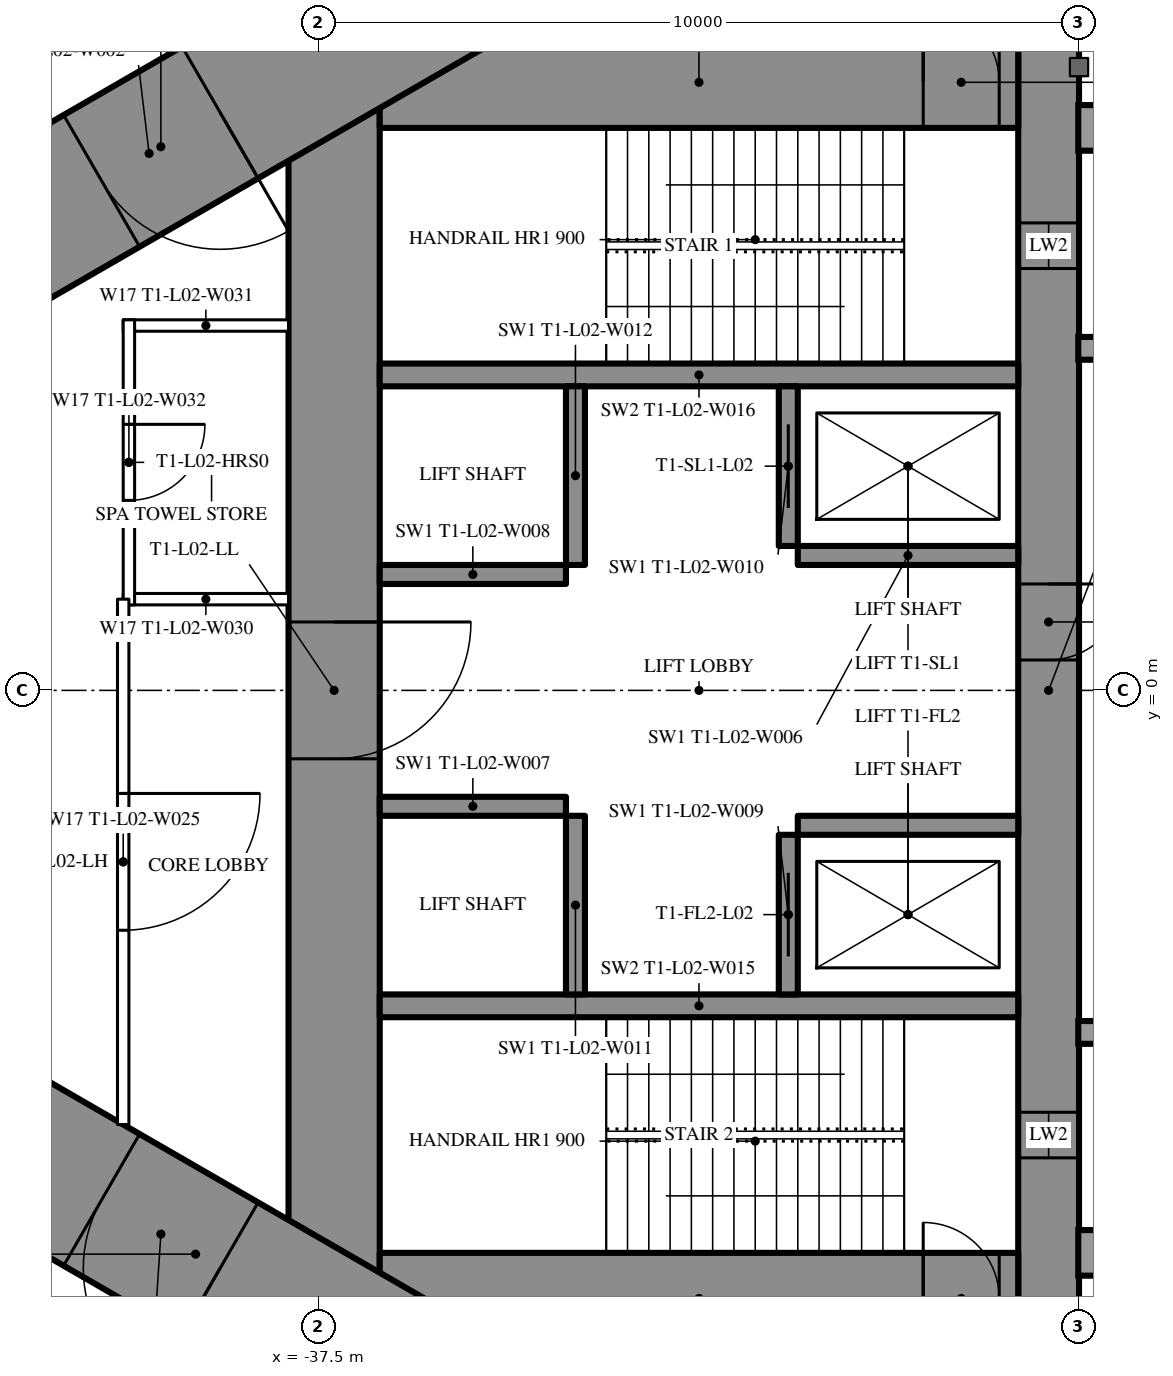
"""IFC4 building model, lengths in metres.
Left out: names, types, materials, properties, quantities, classifications, styles, units other than length and angle.
Written with IfcOpenShell. Run it as: python <this file> out.ifc"""

import sys

from ifc_helpers import new_model, si_unit, direction, frame, frame_2d, origin, place, context, subcontext, project, spatial, rectangle, extrude, element, fill, save


model = new_model("IFC4")
c1 = context("Model", 3, precision=1e-05, world=origin(), true_north=direction((0.0, 1.0)))
c2 = subcontext(c1, "Body", "Model", "MODEL_VIEW")
j1 = project(units=[si_unit("LENGTHUNIT", "METRE"), si_unit("PLANEANGLEUNIT", "RADIAN")], contexts=[c1])
p1 = place(None, origin())
s1 = spatial("IfcSite", under=j1, at=p1, CompositionType="ELEMENT")
p2 = place(p1, origin())
s2 = spatial("IfcBuilding", under=s1, at=p2, CompositionType="ELEMENT")
p3 = place(p2, frame((0.0, 0.0, 12.6)))
s3 = spatial("IfcBuildingStorey", under=s2, at=p3, CompositionType="ELEMENT", Elevation=12.6)
p4 = place(p3, frame((-27.9, 8.6, 0.0), z_axis=(0.0, 0.0, 1.0), x_axis=(0.0, -1.0, 0.0)))
e1 = element("IfcWall", 1, at=p4, inside=s3, PredefinedType="SHEAR", context=c2, shape_type="SweptSolid", body=[
    extrude(rectangle(XDim=17.2, YDim=0.8, at=frame_2d((8.6, 0.0))), origin(), (0.0, 0.0, 1.0), 5.4),
])
p5 = place(p4, frame((7.2, 0.0, 0.0)))
e2 = element("IfcOpeningElement", 2, at=p5, cuts=e1, PredefinedType="OPENING", context=c2, shape_type="SweptSolid", body=[
    extrude(rectangle(XDim=1.0, YDim=2.2, at=frame_2d((0.5, 1.1))), frame((0.0, 0.41, 0.0), z_axis=(0.0, -1.0, 0.0), x_axis=(1.0, 0.0, 0.0)), (0.0, 0.0, 1.0), 0.82),
])
p6 = place(p4, frame((2.45, 0.0, 0.6)))
e3 = element("IfcOpeningElement", 3, at=p6, cuts=e1, PredefinedType="OPENING", context=c2, shape_type="SweptSolid", body=[
    extrude(rectangle(XDim=0.6, YDim=3.9, at=frame_2d((0.3, 1.95))), frame((0.0, 0.41, 0.0), z_axis=(0.0, -1.0, 0.0), x_axis=(1.0, 0.0, 0.0)), (0.0, 0.0, 1.0), 0.82),
])
p7 = place(p4, frame((14.15, 0.0, 0.6)))
e4 = element("IfcOpeningElement", 4, at=p7, cuts=e1, PredefinedType="OPENING", context=c2, shape_type="SweptSolid", body=[
    extrude(rectangle(XDim=0.6, YDim=3.9, at=frame_2d((0.3, 1.95))), frame((0.0, 0.41, 0.0), z_axis=(0.0, -1.0, 0.0), x_axis=(1.0, 0.0, 0.0)), (0.0, 0.0, 1.0), 0.82),
])
p8 = place(p3, frame((-37.3, 8.6, 0.0), z_axis=(0.0, 0.0, 1.0), x_axis=(0.0, -1.0, 0.0)))
e5 = element("IfcWall", 5, at=p8, inside=s3, PredefinedType="SHEAR", context=c2, shape_type="SweptSolid", body=[
    extrude(rectangle(XDim=17.2, YDim=1.2, at=frame_2d((8.6, 0.0))), origin(), (0.0, 0.0, 1.0), 5.4),
])
p9 = place(p8, frame((7.7, 0.0, 0.0)))
e6 = element("IfcOpeningElement", 6, at=p9, cuts=e5, PredefinedType="OPENING", context=c2, shape_type="SweptSolid", body=[
    extrude(rectangle(XDim=1.8, YDim=2.2, at=frame_2d((0.9, 1.1))), frame((0.0, 0.61, 0.0), z_axis=(0.0, -1.0, 0.0), x_axis=(1.0, 0.0, 0.0)), (0.0, 0.0, 1.0), 1.22),
])
p10 = place(p3, frame((-28.3, 8.0, 0.0), z_axis=(0.0, 0.0, 1.0), x_axis=(-1.0, 0.0, 0.0)))
e7 = element("IfcWall", 7, at=p10, inside=s3, PredefinedType="SHEAR", context=c2, shape_type="SweptSolid", body=[
    extrude(rectangle(XDim=8.4, YDim=1.2, at=frame_2d((4.2, 0.0))), origin(), (0.0, 0.0, 1.0), 5.4),
])
p11 = place(p10, frame((0.25, 0.0, 0.0)))
e8 = element("IfcOpeningElement", 8, at=p11, cuts=e7, PredefinedType="OPENING", context=c2, shape_type="SweptSolid", body=[
    extrude(rectangle(XDim=1.0, YDim=2.2, at=frame_2d((0.5, 1.1))), frame((0.0, 0.61, 0.0), z_axis=(0.0, -1.0, 0.0), x_axis=(1.0, 0.0, 0.0)), (0.0, 0.0, 1.0), 1.22),
])
p12 = place(p3, frame((-28.3, -8.0, 0.0), z_axis=(0.0, 0.0, 1.0), x_axis=(-1.0, 0.0, 0.0)))
e9 = element("IfcWall", 9, at=p12, inside=s3, PredefinedType="SHEAR", context=c2, shape_type="SweptSolid", body=[
    extrude(rectangle(XDim=8.4, YDim=1.2, at=frame_2d((4.2, 0.0))), origin(), (0.0, 0.0, 1.0), 5.4),
])
p13 = place(p12, frame((0.25, 0.0, 0.0)))
e10 = element("IfcOpeningElement", 10, at=p13, cuts=e9, PredefinedType="OPENING", context=c2, shape_type="SweptSolid", body=[
    extrude(rectangle(XDim=1.0, YDim=2.2, at=frame_2d((0.5, 1.1))), frame((0.0, 0.61, 0.0), z_axis=(0.0, -1.0, 0.0), x_axis=(1.0, 0.0, 0.0)), (0.0, 0.0, 1.0), 1.22),
])
for number, where, z_axis, x_axis in (
    (11, (-28.3, 4.15, 0.0), (0.0, 0.0, 1.0), (-1.0, 0.0, 0.0)),
    (12, (-28.3, -4.15, 0.0), (0.0, 0.0, 1.0), (-1.0, 0.0, 0.0)),
):
    element("IfcWall", number, at=place(p3, frame(where, z_axis=z_axis, x_axis=x_axis)), inside=s3, PredefinedType="SHEAR", context=c2, shape_type="SweptSolid", body=[
        extrude(rectangle(XDim=8.4, YDim=0.3, at=frame_2d((4.2, 0.0))), origin(), (0.0, 0.0, 1.0), 5.4),
    ])
p14 = place(p3, frame((-31.325, 4.0, 0.0), z_axis=(0.0, 0.0, 1.0), x_axis=(0.0, -1.0, 0.0)))
e13 = element("IfcWall", 13, at=p14, inside=s3, PredefinedType="SHEAR", context=c2, shape_type="SweptSolid", body=[
    extrude(rectangle(XDim=2.1, YDim=0.25, at=frame_2d((1.05, 0.0))), origin(), (0.0, 0.0, 1.0), 5.4),
])
p15 = place(p14, frame((0.5, 0.0, 0.0)))
e14 = element("IfcOpeningElement", 14, at=p15, cuts=e13, PredefinedType="OPENING", context=c2, shape_type="SweptSolid", body=[
    extrude(rectangle(XDim=1.1, YDim=2.2, at=frame_2d((0.55, 1.1))), frame((0.0, 0.135, 0.0), z_axis=(0.0, -1.0, 0.0), x_axis=(1.0, 0.0, 0.0)), (0.0, 0.0, 1.0), 0.27),
])
p16 = place(p3, frame((-34.125, 4.0, 0.0), z_axis=(0.0, 0.0, 1.0), x_axis=(0.0, -1.0, 0.0)))
e15 = element("IfcWall", 15, at=p16, inside=s3, PredefinedType="SHEAR", context=c2, shape_type="SweptSolid", body=[
    extrude(rectangle(XDim=2.35, YDim=0.25, at=frame_2d((1.175, 0.0))), origin(), (0.0, 0.0, 1.0), 5.4),
])
p17 = place(p3, frame((-28.3, 1.775, 0.0), z_axis=(0.0, 0.0, 1.0), x_axis=(-1.0, 0.0, 0.0)))
e16 = element("IfcWall", 16, at=p17, inside=s3, PredefinedType="SHEAR", context=c2, shape_type="SweptSolid", body=[
    extrude(rectangle(XDim=2.9, YDim=0.25, at=frame_2d((1.45, 0.0))), origin(), (0.0, 0.0, 1.0), 5.4),
])
p18 = place(p3, frame((-34.25, 1.525, 0.0), z_axis=(0.0, 0.0, 1.0), x_axis=(-1.0, 0.0, 0.0)))
e17 = element("IfcWall", 17, at=p18, inside=s3, PredefinedType="SHEAR", context=c2, shape_type="SweptSolid", body=[
    extrude(rectangle(XDim=2.45, YDim=0.25, at=frame_2d((1.225, 0.0))), origin(), (0.0, 0.0, 1.0), 5.4),
])
p19 = place(p3, frame((-31.325, -1.9, 0.0), z_axis=(0.0, 0.0, 1.0), x_axis=(0.0, -1.0, 0.0)))
e18 = element("IfcWall", 18, at=p19, inside=s3, PredefinedType="SHEAR", context=c2, shape_type="SweptSolid", body=[
    extrude(rectangle(XDim=2.1, YDim=0.25, at=frame_2d((1.05, 0.0))), origin(), (0.0, 0.0, 1.0), 5.4),
])
p20 = place(p19, frame((0.5, 0.0, 0.0)))
e19 = element("IfcOpeningElement", 19, at=p20, cuts=e18, PredefinedType="OPENING", context=c2, shape_type="SweptSolid", body=[
    extrude(rectangle(XDim=1.1, YDim=2.2, at=frame_2d((0.55, 1.1))), frame((0.0, 0.135, 0.0), z_axis=(0.0, -1.0, 0.0), x_axis=(1.0, 0.0, 0.0)), (0.0, 0.0, 1.0), 0.27),
])
p21 = place(p3, frame((-34.125, -1.65, 0.0), z_axis=(0.0, 0.0, 1.0), x_axis=(0.0, -1.0, 0.0)))
e20 = element("IfcWall", 20, at=p21, inside=s3, PredefinedType="SHEAR", context=c2, shape_type="SweptSolid", body=[
    extrude(rectangle(XDim=2.35, YDim=0.25, at=frame_2d((1.175, 0.0))), origin(), (0.0, 0.0, 1.0), 5.4),
])
p22 = place(p3, frame((-28.3, -1.775, 0.0), z_axis=(0.0, 0.0, 1.0), x_axis=(-1.0, 0.0, 0.0)))
e21 = element("IfcWall", 21, at=p22, inside=s3, PredefinedType="SHEAR", context=c2, shape_type="SweptSolid", body=[
    extrude(rectangle(XDim=2.9, YDim=0.25, at=frame_2d((1.45, 0.0))), origin(), (0.0, 0.0, 1.0), 5.4),
])
p23 = place(p3, frame((-34.25, -1.525, 0.0), z_axis=(0.0, 0.0, 1.0), x_axis=(-1.0, 0.0, 0.0)))
e22 = element("IfcWall", 22, at=p23, inside=s3, PredefinedType="SHEAR", context=c2, shape_type="SweptSolid", body=[
    extrude(rectangle(XDim=2.45, YDim=0.25, at=frame_2d((1.225, 0.0))), origin(), (0.0, 0.0, 1.0), 5.4),
])
p24 = place(p3, frame((-27.2, 14.3, 0.0), z_axis=(0.0, 0.0, 1.0), x_axis=(-0.866026593062, -0.499997940104, 0.0)))
e23 = element("IfcWall", 23, at=p24, inside=s3, PredefinedType="SHEAR", context=c2, shape_type="SweptSolid", body=[
    extrude(rectangle(XDim=28.946, YDim=2.0, at=frame_2d((14.473, 0.0))), origin(), (0.0, 0.0, 1.0), 5.4),
])
p25 = place(p24, frame((4.6, 0.0, 0.0)))
e24 = element("IfcOpeningElement", 24, at=p25, cuts=e23, PredefinedType="OPENING", context=c2, shape_type="SweptSolid", body=[
    extrude(rectangle(XDim=1.0, YDim=2.2, at=frame_2d((0.5, 1.1))), frame((0.0, 1.01, 0.0), z_axis=(0.0, -1.0, 0.0), x_axis=(1.0, 0.0, 0.0)), (0.0, 0.0, 1.0), 2.02),
])
p26 = place(p24, frame((13.395, 0.0, 0.0)))
e25 = element("IfcOpeningElement", 25, at=p26, cuts=e23, PredefinedType="OPENING", context=c2, shape_type="SweptSolid", body=[
    extrude(rectangle(XDim=1.8, YDim=2.2, at=frame_2d((0.9, 1.1))), frame((0.0, 1.01, 0.0), z_axis=(0.0, -1.0, 0.0), x_axis=(1.0, 0.0, 0.0)), (0.0, 0.0, 1.0), 2.02),
])
p27 = place(p3, frame((-27.2, -14.3, 0.0), z_axis=(0.0, 0.0, 1.0), x_axis=(-0.866024044937, 0.500002353585, 0.0)))
e26 = element("IfcWall", 26, at=p27, inside=s3, PredefinedType="SHEAR", context=c2, shape_type="SweptSolid", body=[
    extrude(rectangle(XDim=27.533, YDim=2.0, at=frame_2d((13.767, 0.0))), origin(), (0.0, 0.0, 1.0), 5.4),
])
p28 = place(p27, frame((4.6, 0.0, 0.0)))
e27 = element("IfcOpeningElement", 27, at=p28, cuts=e26, PredefinedType="OPENING", context=c2, shape_type="SweptSolid", body=[
    extrude(rectangle(XDim=1.0, YDim=2.2, at=frame_2d((0.5, 1.1))), frame((0.0, 1.01, 0.0), z_axis=(0.0, -1.0, 0.0), x_axis=(1.0, 0.0, 0.0)), (0.0, 0.0, 1.0), 2.02),
])
p29 = place(p27, frame((13.395, 0.0, 0.0)))
e28 = element("IfcOpeningElement", 28, at=p29, cuts=e26, PredefinedType="OPENING", context=c2, shape_type="SweptSolid", body=[
    extrude(rectangle(XDim=1.8, YDim=2.2, at=frame_2d((0.9, 1.1))), frame((0.0, 1.01, 0.0), z_axis=(0.0, -1.0, 0.0), x_axis=(1.0, 0.0, 0.0)), (0.0, 0.0, 1.0), 2.02),
])
p30 = place(p3, frame((-37.9, 11.24, 0.0), z_axis=(0.0, 0.0, 1.0), x_axis=(-0.866022995118, -0.50000417191, 0.0)))
e29 = element("IfcWall", 29, at=p30, inside=s3, PredefinedType="PARTITIONING", context=c2, shape_type="SweptSolid", body=[
    extrude(rectangle(XDim=22.48, YDim=0.2, at=frame_2d((11.24, 0.0))), origin(), (0.0, 0.0, 1.0), 4.25),
])
p31 = place(p30, frame((14.644, 0.0, 0.0)))
e30 = element("IfcOpeningElement", 30, at=p31, cuts=e29, PredefinedType="OPENING", context=c2, shape_type="SweptSolid", body=[
    extrude(rectangle(XDim=1.8, YDim=2.2, at=frame_2d((0.9, 1.1))), frame((0.0, 0.11, 0.0), z_axis=(0.0, -1.0, 0.0), x_axis=(1.0, 0.0, 0.0)), (0.0, 0.0, 1.0), 0.22),
])
p32 = place(p30, frame((20.069, 0.0, 0.0)))
e31 = element("IfcOpeningElement", 31, at=p32, cuts=e29, PredefinedType="OPENING", context=c2, shape_type="SweptSolid", body=[
    extrude(rectangle(XDim=1.8, YDim=2.2, at=frame_2d((0.9, 1.1))), frame((0.0, 0.11, 0.0), z_axis=(0.0, -1.0, 0.0), x_axis=(1.0, 0.0, 0.0)), (0.0, 0.0, 1.0), 0.22),
])
p33 = place(p30, frame((4.915, 0.0, 0.0)))
e32 = element("IfcOpeningElement", 32, at=p33, cuts=e29, PredefinedType="OPENING", context=c2, shape_type="SweptSolid", body=[
    extrude(rectangle(XDim=1.8, YDim=2.2, at=frame_2d((0.9, 1.1))), frame((0.0, 0.11, 0.0), z_axis=(0.0, -1.0, 0.0), x_axis=(1.0, 0.0, 0.0)), (0.0, 0.0, 1.0), 0.22),
])
p34 = place(p3, frame((-37.12, -11.69, 0.0), z_axis=(0.0, 0.0, 1.0), x_axis=(-0.866028803602, 0.499994111297, 0.0)))
e33 = element("IfcWall", 33, at=p34, inside=s3, PredefinedType="PARTITIONING", context=c2, shape_type="SweptSolid", body=[
    extrude(rectangle(XDim=23.26, YDim=0.2, at=frame_2d((11.63, 0.0))), origin(), (0.0, 0.0, 1.0), 4.25),
])
p35 = place(p34, frame((20.909, 0.0, 0.0)))
e34 = element("IfcOpeningElement", 34, at=p35, cuts=e33, PredefinedType="OPENING", context=c2, shape_type="SweptSolid", body=[
    extrude(rectangle(XDim=1.8, YDim=2.2, at=frame_2d((0.9, 1.1))), frame((0.0, 0.11, 0.0), z_axis=(0.0, -1.0, 0.0), x_axis=(1.0, 0.0, 0.0)), (0.0, 0.0, 1.0), 0.22),
])
p36 = place(p34, frame((15.544, 0.0, 0.0)))
e35 = element("IfcOpeningElement", 35, at=p36, cuts=e33, PredefinedType="OPENING", context=c2, shape_type="SweptSolid", body=[
    extrude(rectangle(XDim=1.8, YDim=2.2, at=frame_2d((0.9, 1.1))), frame((0.0, 0.11, 0.0), z_axis=(0.0, -1.0, 0.0), x_axis=(1.0, 0.0, 0.0)), (0.0, 0.0, 1.0), 0.22),
])
p37 = place(p34, frame((5.365, 0.0, 0.0)))
e36 = element("IfcOpeningElement", 36, at=p37, cuts=e33, PredefinedType="OPENING", context=c2, shape_type="SweptSolid", body=[
    extrude(rectangle(XDim=1.8, YDim=2.2, at=frame_2d((0.9, 1.1))), frame((0.0, 0.11, 0.0), z_axis=(0.0, -1.0, 0.0), x_axis=(1.0, 0.0, 0.0)), (0.0, 0.0, 1.0), 0.22),
])
for number, where, z_axis, x_axis in (
    (37, (-37.9, 1.2, 0.0), (0.0, 0.0, 1.0), (-1.0, 0.0, 0.0)),
    (38, (-37.9, 4.8, 0.0), (0.0, 0.0, 1.0), (-1.0, 0.0, 0.0)),
):
    element("IfcWall", number, at=place(p3, frame(where, z_axis=z_axis, x_axis=x_axis)), inside=s3, PredefinedType="PARTITIONING", context=c2, shape_type="SweptSolid", body=[
        extrude(rectangle(XDim=2.175, YDim=0.15, at=frame_2d((1.087, 0.0))), origin(), (0.0, 0.0, 1.0), 5.15),
    ])
p38 = place(p3, frame((-40.0, 4.875, 0.0), z_axis=(0.0, 0.0, 1.0), x_axis=(0.0, -1.0, 0.0)))
e39 = element("IfcWall", 39, at=p38, inside=s3, PredefinedType="PARTITIONING", context=c2, shape_type="SweptSolid", body=[
    extrude(rectangle(XDim=3.75, YDim=0.15, at=frame_2d((1.875, 0.0))), origin(), (0.0, 0.0, 1.0), 5.15),
])
p39 = place(p38, frame((1.375, 0.0, 0.0)))
e40 = element("IfcOpeningElement", 40, at=p39, cuts=e39, PredefinedType="OPENING", context=c2, shape_type="SweptSolid", body=[
    extrude(rectangle(XDim=1.0, YDim=2.2, at=frame_2d((0.5, 1.1))), frame((0.0, 0.085, 0.0), z_axis=(0.0, -1.0, 0.0), x_axis=(1.0, 0.0, 0.0)), (0.0, 0.0, 1.0), 0.17),
])
p40 = place(p3, frame((-40.075, 1.2, 0.0), z_axis=(0.0, 0.0, 1.0), x_axis=(0.0, -1.0, 0.0)))
e41 = element("IfcWall", 41, at=p40, inside=s3, PredefinedType="PARTITIONING", context=c2, shape_type="SweptSolid", body=[
    extrude(rectangle(XDim=6.912, YDim=0.15, at=frame_2d((3.456, 0.0))), origin(), (0.0, 0.0, 1.0), 5.15),
])
p41 = place(p40, frame((2.556, 0.0, 0.0)))
e42 = element("IfcOpeningElement", 42, at=p41, cuts=e41, PredefinedType="OPENING", context=c2, shape_type="SweptSolid", body=[
    extrude(rectangle(XDim=1.8, YDim=2.2, at=frame_2d((0.9, 1.1))), frame((0.0, 0.085, 0.0), z_axis=(0.0, -1.0, 0.0), x_axis=(1.0, 0.0, 0.0)), (0.0, 0.0, 1.0), 0.17),
])
p42 = place(p39, origin())
e43 = element("IfcDoor", 43, at=p42, inside=s3, OperationType="SINGLE_SWING_LEFT", PredefinedType="DOOR", context=c2, shape_type="SweptSolid", body=[
    extrude(rectangle(XDim=1.0, YDim=2.2, at=frame_2d((0.5, 1.1))), frame((0.0, 0.025, 0.0), z_axis=(0.0, -1.0, 0.0), x_axis=(1.0, 0.0, 0.0)), (0.0, 0.0, 1.0), 0.05),
])
fill(e40, e43)
p43 = place(p41, origin())
e44 = element("IfcDoor", 44, at=p43, inside=s3, OperationType="DOUBLE_DOOR_SINGLE_SWING", PredefinedType="DOOR", context=c2, shape_type="SweptSolid", body=[
    extrude(rectangle(XDim=1.8, YDim=2.2, at=frame_2d((0.9, 1.1))), frame((0.0, 0.025, 0.0), z_axis=(0.0, -1.0, 0.0), x_axis=(1.0, 0.0, 0.0)), (0.0, 0.0, 1.0), 0.05),
])
fill(e42, e44)
p44 = place(p26, origin())
e45 = element("IfcDoor", 45, at=p44, inside=s3, OperationType="DOUBLE_DOOR_SINGLE_SWING", PredefinedType="DOOR", context=c2, shape_type="SweptSolid", body=[
    extrude(rectangle(XDim=1.8, YDim=2.2, at=frame_2d((0.9, 1.1))), frame((0.0, 0.025, 0.0), z_axis=(0.0, -1.0, 0.0), x_axis=(1.0, 0.0, 0.0)), (0.0, 0.0, 1.0), 0.05),
])
fill(e25, e45)
p45 = place(p29, origin())
e46 = element("IfcDoor", 46, at=p45, inside=s3, OperationType="DOUBLE_DOOR_SINGLE_SWING", PredefinedType="DOOR", context=c2, shape_type="SweptSolid", body=[
    extrude(rectangle(XDim=1.8, YDim=2.2, at=frame_2d((0.9, 1.1))), frame((0.0, 0.025, 0.0), z_axis=(0.0, -1.0, 0.0), x_axis=(1.0, 0.0, 0.0)), (0.0, 0.0, 1.0), 0.05),
])
fill(e28, e46)
p46 = place(p9, origin())
e47 = element("IfcDoor", 47, at=p46, inside=s3, OperationType="DOUBLE_DOOR_SINGLE_SWING", PredefinedType="DOOR", context=c2, shape_type="SweptSolid", body=[
    extrude(rectangle(XDim=1.8, YDim=2.2, at=frame_2d((0.9, 1.1))), frame((0.0, 0.025, 0.0), z_axis=(0.0, -1.0, 0.0), x_axis=(1.0, 0.0, 0.0)), (0.0, 0.0, 1.0), 0.05),
])
fill(e6, e47)
p47 = place(p11, origin())
e48 = element("IfcDoor", 48, at=p47, inside=s3, OperationType="SINGLE_SWING_RIGHT", PredefinedType="DOOR", context=c2, shape_type="SweptSolid", body=[
    extrude(rectangle(XDim=1.0, YDim=2.2, at=frame_2d((0.5, 1.1))), frame((0.0, 0.025, 0.0), z_axis=(0.0, -1.0, 0.0), x_axis=(1.0, 0.0, 0.0)), (0.0, 0.0, 1.0), 0.05),
])
fill(e8, e48)
p48 = place(p5, origin())
e49 = element("IfcDoor", 49, at=p48, inside=s3, OperationType="SINGLE_SWING_LEFT", PredefinedType="DOOR", context=c2, shape_type="SweptSolid", body=[
    extrude(rectangle(XDim=1.0, YDim=2.2, at=frame_2d((0.5, 1.1))), frame((0.0, 0.025, 0.0), z_axis=(0.0, -1.0, 0.0), x_axis=(1.0, 0.0, 0.0)), (0.0, 0.0, 1.0), 0.05),
])
fill(e2, e49)
p49 = place(p15, origin())
e50 = element("IfcDoor", 50, at=p49, inside=s3, OperationType="SLIDING_TO_LEFT", PredefinedType="USERDEFINED", context=c2, shape_type="SweptSolid", body=[
    extrude(rectangle(XDim=1.1, YDim=2.2, at=frame_2d((0.55, 1.1))), frame((0.0, 0.025, 0.0), z_axis=(0.0, -1.0, 0.0), x_axis=(1.0, 0.0, 0.0)), (0.0, 0.0, 1.0), 0.05),
])
fill(e14, e50)
p50 = place(p20, origin())
e51 = element("IfcDoor", 51, at=p50, inside=s3, OperationType="SLIDING_TO_LEFT", PredefinedType="USERDEFINED", context=c2, shape_type="SweptSolid", body=[
    extrude(rectangle(XDim=1.1, YDim=2.2, at=frame_2d((0.55, 1.1))), frame((0.0, 0.025, 0.0), z_axis=(0.0, -1.0, 0.0), x_axis=(1.0, 0.0, 0.0)), (0.0, 0.0, 1.0), 0.05),
])
fill(e19, e51)
p51 = place(p6, origin())
e52 = element("IfcWindow", 52, at=p51, inside=s3, PartitioningType="SINGLE_PANEL", PredefinedType="WINDOW", context=c2, shape_type="SweptSolid", body=[
    extrude(rectangle(XDim=0.6, YDim=3.9, at=frame_2d((0.3, 1.95))), frame((0.0, 0.03, 0.0), z_axis=(0.0, -1.0, 0.0), x_axis=(1.0, 0.0, 0.0)), (0.0, 0.0, 1.0), 0.06),
])
fill(e3, e52)
p52 = place(p7, origin())
e53 = element("IfcWindow", 53, at=p52, inside=s3, PartitioningType="SINGLE_PANEL", PredefinedType="WINDOW", context=c2, shape_type="SweptSolid", body=[
    extrude(rectangle(XDim=0.6, YDim=3.9, at=frame_2d((0.3, 1.95))), frame((0.0, 0.03, 0.0), z_axis=(0.0, -1.0, 0.0), x_axis=(1.0, 0.0, 0.0)), (0.0, 0.0, 1.0), 0.06),
])
fill(e4, e53)
save(model, sys.argv[1])
